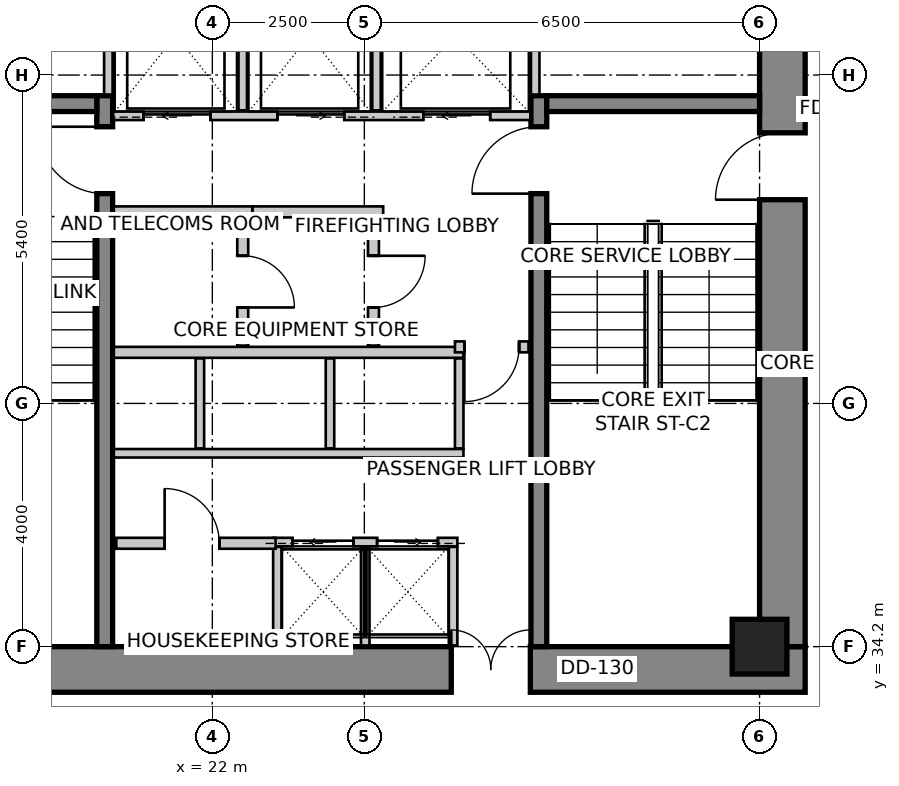
"""IFC4 building model, lengths in metres.
Left out: names, types, materials, properties, quantities, classifications, styles, units other than length and angle.
Written with IfcOpenShell. Run it as: python <this file> out.ifc"""

import sys

from ifc_helpers import new_model, si_unit, direction, frame, frame_2d, origin, origin_2d, place, context, subcontext, project, spatial, rectangle, extrude, source, transform, mapped, element, fill, save


model = new_model("IFC4")
c1 = context("Model", 3, precision=1e-05, world=origin(), true_north=direction((0.0, 1.0)))
c2 = subcontext(c1, "Body", "Model", "MODEL_VIEW")
j1 = project(units=[si_unit("LENGTHUNIT", "METRE"), si_unit("PLANEANGLEUNIT", "RADIAN")], contexts=[c1])
p1 = place(None, origin())
s1 = spatial("IfcSite", under=j1, at=p1, CompositionType="ELEMENT")
p2 = place(p1, origin())
s2 = spatial("IfcBuilding", under=s1, at=p2, CompositionType="ELEMENT")
p3 = place(p2, frame((0.0, 0.0, 125.0)))
s3 = spatial("IfcBuildingStorey", under=s2, at=p3, CompositionType="ELEMENT", Elevation=125.0)
p4 = place(p3, frame((15.85, 33.825, 0.0), z_axis=(0.0, 0.0, 1.0), x_axis=(1.0, 0.0, 0.0)))
e1 = element("IfcWall", 1, at=p4, inside=s3, PredefinedType="SHEAR", context=c2, shape_type="SweptSolid", body=[
    extrude(rectangle(XDim=15.9, YDim=0.75, at=frame_2d((7.95, 0.0))), origin(), (0.0, 0.0, 1.0), 3.6),
])
m1 = source(origin(), c2, "Body", "SweptSolid", [
    extrude(rectangle(XDim=1.3, YDim=2.15, at=frame_2d((0.65, 1.075))), frame((0.0, 0.385, 0.0), z_axis=(0.0, -1.0, 0.0), x_axis=(1.0, 0.0, 0.0)), (0.0, 0.0, 1.0), 0.77),
])
p5 = place(p4, frame((10.08, 0.0, 0.0)))
e2 = element("IfcOpeningElement", 2, at=p5, cuts=e1, PredefinedType="OPENING", context=c2, shape_type="MappedRepresentation", body=[
    mapped(m1, transform((0.0, 0.0, 0.0), scale=1.0)),
])
p6 = place(p3, frame((31.375, 34.2, 0.0), z_axis=(0.0, 0.0, 1.0), x_axis=(0.0, 1.0, 0.0)))
e3 = element("IfcWall", 3, at=p6, inside=s3, PredefinedType="SHEAR", context=c2, shape_type="SweptSolid", body=[
    extrude(rectangle(XDim=11.4, YDim=0.75, at=frame_2d((5.7, 0.0))), origin(), (0.0, 0.0, 1.0), 3.6),
])
m2 = source(origin(), c2, "Body", "SweptSolid", [
    extrude(rectangle(XDim=1.1, YDim=2.15, at=frame_2d((0.55, 1.075))), frame((0.0, 0.385, 0.0), z_axis=(0.0, -1.0, 0.0), x_axis=(1.0, 0.0, 0.0)), (0.0, 0.0, 1.0), 0.77),
])
p7 = place(p6, frame((7.35, 0.0, 0.0)))
e4 = element("IfcOpeningElement", 4, at=p7, cuts=e3, PredefinedType="OPENING", context=c2, shape_type="MappedRepresentation", body=[
    mapped(m2, transform((0.0, 0.0, 0.0), scale=1.0)),
])
p8 = place(p3, frame((20.23, 34.2, 0.0), z_axis=(0.0, 0.0, 1.0), x_axis=(0.0, 1.0, 0.0)))
e5 = element("IfcWall", 5, at=p8, inside=s3, PredefinedType="SHEAR", context=c2, shape_type="SweptSolid", body=[
    extrude(rectangle(XDim=9.06, YDim=0.26, at=frame_2d((4.53, 0.0))), origin(), (0.0, 0.0, 1.0), 3.6),
])
m3 = source(origin(), c2, "Body", "SweptSolid", [
    extrude(rectangle(XDim=1.1, YDim=2.15, at=frame_2d((0.55, 1.075))), frame((0.0, 0.14, 0.0), z_axis=(0.0, -1.0, 0.0), x_axis=(1.0, 0.0, 0.0)), (0.0, 0.0, 1.0), 0.28),
])
p9 = place(p8, frame((7.45, 0.0, 0.0)))
e6 = element("IfcOpeningElement", 6, at=p9, cuts=e5, PredefinedType="OPENING", context=c2, shape_type="MappedRepresentation", body=[
    mapped(m3, transform((0.0, 0.0, 0.0), scale=1.0)),
])
p10 = place(p3, frame((27.37, 34.2, 0.0), z_axis=(0.0, 0.0, 1.0), x_axis=(0.0, 1.0, 0.0)))
e7 = element("IfcWall", 7, at=p10, inside=s3, PredefinedType="SHEAR", context=c2, shape_type="SweptSolid", body=[
    extrude(rectangle(XDim=9.06, YDim=0.26, at=frame_2d((4.53, 0.0))), origin(), (0.0, 0.0, 1.0), 3.6),
])
p11 = place(p10, frame((7.45, 0.0, 0.0)))
e8 = element("IfcOpeningElement", 8, at=p11, cuts=e7, PredefinedType="OPENING", context=c2, shape_type="MappedRepresentation", body=[
    mapped(m3, transform((0.0, 0.0, 0.0), scale=1.0)),
])
for number, where, z_axis, x_axis in (
    (9, (16.6, 43.13, 0.0), (0.0, 0.0, 1.0), (1.0, 0.0, 0.0)),
    (10, (27.5, 43.13, 0.0), (0.0, 0.0, 1.0), (1.0, 0.0, 0.0)),
):
    element("IfcWall", number, at=place(p3, frame(where, z_axis=z_axis, x_axis=x_axis)), inside=s3, PredefinedType="SHEAR", context=c2, shape_type="SweptSolid", body=[
        extrude(rectangle(XDim=3.5, YDim=0.26, at=frame_2d((1.75, 0.0))), origin(), (0.0, 0.0, 1.0), 3.6),
    ])
m4 = source(origin(), c2, "Body", "SweptSolid", [
    extrude(rectangle(XDim=0.9, YDim=0.9, at=origin_2d()), origin(), (0.0, 0.0, 1.0), 3.6),
])
p12 = place(p3, frame((31.0, 34.2, 0.0), z_axis=(0.0, 0.0, 1.0), x_axis=(1.0, 0.0, 0.0)))
e11 = element("IfcColumn", 11, at=p12, inside=s3, PredefinedType="COLUMN", context=c2, shape_type="MappedRepresentation", body=[
    mapped(m4, transform((0.0, 0.0, 0.0), scale=1.0)),
])
p13 = place(p3, frame((20.37, 42.93, 0.0), z_axis=(0.0, 0.0, 1.0), x_axis=(1.0, 0.0, 0.0)))
e12 = element("IfcWall", 12, at=p13, inside=s3, PredefinedType="SOLIDWALL", context=c2, shape_type="SweptSolid", body=[
    extrude(rectangle(XDim=6.86, YDim=0.14, at=frame_2d((3.43, 0.0))), origin(), (0.0, 0.0, 1.0), 3.35),
])
m5 = source(origin(), c2, "Body", "SweptSolid", [
    extrude(rectangle(XDim=1.1, YDim=2.15, at=frame_2d((0.55, 1.075))), frame((0.0, 0.08, 0.0), z_axis=(0.0, -1.0, 0.0), x_axis=(1.0, 0.0, 0.0)), (0.0, 0.0, 1.0), 0.16),
])
p14 = place(p13, frame((0.5, 0.0, 0.0)))
e13 = element("IfcOpeningElement", 13, at=p14, cuts=e12, PredefinedType="OPENING", context=c2, shape_type="MappedRepresentation", body=[
    mapped(m5, transform((0.0, 0.0, 0.0), scale=1.0)),
])
p15 = place(p13, frame((2.7, 0.0, 0.0)))
e14 = element("IfcOpeningElement", 14, at=p15, cuts=e12, PredefinedType="OPENING", context=c2, shape_type="MappedRepresentation", body=[
    mapped(m5, transform((0.0, 0.0, 0.0), scale=1.0)),
])
p16 = place(p13, frame((5.1, 0.0, 0.0)))
e15 = element("IfcOpeningElement", 15, at=p16, cuts=e12, PredefinedType="OPENING", context=c2, shape_type="MappedRepresentation", body=[
    mapped(m5, transform((0.0, 0.0, 0.0), scale=1.0)),
])
for number, where, z_axis, x_axis in (
    (16, (20.29, 43.28, 0.0), (0.0, 0.0, 1.0), (0.0, 1.0, 0.0)),
    (17, (27.31, 43.28, 0.0), (0.0, 0.0, 1.0), (0.0, 1.0, 0.0)),
):
    element("IfcWall", number, at=place(p3, frame(where, z_axis=z_axis, x_axis=x_axis)), inside=s3, PredefinedType="SOLIDWALL", context=c2, shape_type="SweptSolid", body=[
        extrude(rectangle(XDim=2.3, YDim=0.14, at=frame_2d((1.15, 0.0))), origin(), (0.0, 0.0, 1.0), 3.35),
    ])
for number, where, z_axis, x_axis in (
    (18, (22.5, 43.02, 0.0), (0.0, 0.0, 1.0), (0.0, 1.0, 0.0)),
    (19, (24.7, 43.02, 0.0), (0.0, 0.0, 1.0), (0.0, 1.0, 0.0)),
):
    element("IfcWall", number, at=place(p3, frame(where, z_axis=z_axis, x_axis=x_axis)), inside=s3, PredefinedType="SOLIDWALL", context=c2, shape_type="SweptSolid", body=[
        extrude(rectangle(XDim=2.56, YDim=0.14, at=frame_2d((1.28, 0.0))), origin(), (0.0, 0.0, 1.0), 3.35),
    ])
p17 = place(p3, frame((23.0, 35.92, 0.0), z_axis=(0.0, 0.0, 1.0), x_axis=(1.0, 0.0, 0.0)))
e20 = element("IfcWall", 20, at=p17, inside=s3, PredefinedType="SOLIDWALL", context=c2, shape_type="SweptSolid", body=[
    extrude(rectangle(XDim=3.03, YDim=0.14, at=frame_2d((1.515, 0.0))), origin(), (0.0, 0.0, 1.0), 3.35),
])
m6 = source(origin(), c2, "Body", "SweptSolid", [
    extrude(rectangle(XDim=1.0, YDim=2.15, at=frame_2d((0.5, 1.075))), frame((0.0, 0.08, 0.0), z_axis=(0.0, -1.0, 0.0), x_axis=(1.0, 0.0, 0.0)), (0.0, 0.0, 1.0), 0.16),
])
p18 = place(p17, frame((0.32, 0.0, 0.0)))
e21 = element("IfcOpeningElement", 21, at=p18, cuts=e20, PredefinedType="OPENING", context=c2, shape_type="MappedRepresentation", body=[
    mapped(m6, transform((0.0, 0.0, 0.0), scale=1.0)),
])
p19 = place(p17, frame((1.71, 0.0, 0.0)))
e22 = element("IfcOpeningElement", 22, at=p19, cuts=e20, PredefinedType="OPENING", context=c2, shape_type="MappedRepresentation", body=[
    mapped(m6, transform((0.0, 0.0, 0.0), scale=1.0)),
])
for number, where, z_axis, x_axis in (
    (23, (25.96, 34.22, 0.0), (0.0, 0.0, 1.0), (0.0, 1.0, 0.0)),
    (24, (23.07, 34.22, 0.0), (0.0, 0.0, 1.0), (0.0, 1.0, 0.0)),
    (25, (24.515, 34.22, 0.0), (0.0, 0.0, 1.0), (0.0, 1.0, 0.0)),
):
    element("IfcWall", number, at=place(p3, frame(where, z_axis=z_axis, x_axis=x_axis)), inside=s3, PredefinedType="SOLIDWALL", context=c2, shape_type="SweptSolid", body=[
        extrude(rectangle(XDim=1.62, YDim=0.14, at=frame_2d((0.81, 0.0))), origin(), (0.0, 0.0, 1.0), 2.642),
    ])
p20 = place(p3, frame((20.38, 37.38, 0.0), z_axis=(0.0, 0.0, 1.0), x_axis=(1.0, 0.0, 0.0)))
e26 = element("IfcWall", 26, at=p20, inside=s3, PredefinedType="SOLIDWALL", context=c2, shape_type="SweptSolid", body=[
    extrude(rectangle(XDim=5.75, YDim=0.14, at=frame_2d((2.875, 0.0))), origin(), (0.0, 0.0, 1.0), 3.35),
])
p21 = place(p3, frame((20.38, 39.04, 0.0), z_axis=(0.0, 0.0, 1.0), x_axis=(1.0, 0.0, 0.0)))
e27 = element("IfcWall", 27, at=p21, inside=s3, PredefinedType="SOLIDWALL", context=c2, shape_type="SweptSolid", body=[
    extrude(rectangle(XDim=5.75, YDim=0.18, at=frame_2d((2.875, 0.0))), origin(), (0.0, 0.0, 1.0), 3.35),
])
for number, where, z_axis, x_axis in (
    (28, (26.06, 37.46, 0.0), (0.0, 0.0, 1.0), (0.0, 1.0, 0.0)),
    (29, (21.795, 37.46, 0.0), (0.0, 0.0, 1.0), (0.0, 1.0, 0.0)),
    (30, (23.935, 37.46, 0.0), (0.0, 0.0, 1.0), (0.0, 1.0, 0.0)),
):
    element("IfcWall", number, at=place(p3, frame(where, z_axis=z_axis, x_axis=x_axis)), inside=s3, PredefinedType="SOLIDWALL", context=c2, shape_type="SweptSolid", body=[
        extrude(rectangle(XDim=1.48, YDim=0.14, at=frame_2d((0.74, 0.0))), origin(), (0.0, 0.0, 1.0), 3.35),
    ])
p22 = place(p3, frame((22.66, 41.35, 0.0), z_axis=(0.0, 0.0, 1.0), x_axis=(-1.0, 0.0, 0.0)))
e31 = element("IfcWall", 31, at=p22, inside=s3, PredefinedType="PARTITIONING", context=c2, shape_type="SweptSolid", body=[
    extrude(rectangle(XDim=2.28, YDim=0.18, at=frame_2d((1.14, 0.0))), origin(), (0.0, 0.0, 1.0), 3.35),
])
p23 = place(p3, frame((24.81, 41.35, 0.0), z_axis=(0.0, 0.0, 1.0), x_axis=(-1.0, 0.0, 0.0)))
e32 = element("IfcWall", 32, at=p23, inside=s3, PredefinedType="PARTITIONING", context=c2, shape_type="SweptSolid", body=[
    extrude(rectangle(XDim=2.148, YDim=0.18, at=frame_2d((1.074, 0.0))), origin(), (0.0, 0.0, 1.0), 3.35),
])
p24 = place(p3, frame((22.5, 41.256, 0.0), z_axis=(0.0, 0.0, 1.0), x_axis=(0.0, -1.0, 0.0)))
e33 = element("IfcWall", 33, at=p24, inside=s3, PredefinedType="PARTITIONING", context=c2, shape_type="SweptSolid", body=[
    extrude(rectangle(XDim=2.106, YDim=0.18, at=frame_2d((1.053, 0.0))), origin(), (0.0, 0.0, 1.0), 3.35),
])
m7 = source(origin(), c2, "Body", "SweptSolid", [
    extrude(rectangle(XDim=0.85, YDim=2.15, at=frame_2d((0.425, 1.075))), frame((0.0, 0.1, 0.0), z_axis=(0.0, -1.0, 0.0), x_axis=(1.0, 0.0, 0.0)), (0.0, 0.0, 1.0), 0.2),
])
p25 = place(p24, frame((0.628, 0.0, 0.0)))
e34 = element("IfcOpeningElement", 34, at=p25, cuts=e33, PredefinedType="OPENING", context=c2, shape_type="MappedRepresentation", body=[
    mapped(m7, transform((0.0, 0.0, 0.0), scale=1.0)),
])
p26 = place(p3, frame((24.65, 41.256, 0.0), z_axis=(0.0, 0.0, 1.0), x_axis=(0.0, -1.0, 0.0)))
e35 = element("IfcWall", 35, at=p26, inside=s3, PredefinedType="PARTITIONING", context=c2, shape_type="SweptSolid", body=[
    extrude(rectangle(XDim=2.106, YDim=0.18, at=frame_2d((1.053, 0.0))), origin(), (0.0, 0.0, 1.0), 3.35),
])
p27 = place(p26, frame((0.628, 0.0, 0.0)))
e36 = element("IfcOpeningElement", 36, at=p27, cuts=e35, PredefinedType="OPENING", context=c2, shape_type="MappedRepresentation", body=[
    mapped(m7, transform((0.0, 0.0, 0.0), scale=1.0)),
])
p28 = place(p3, frame((27.2, 39.13, 0.0), z_axis=(0.0, 0.0, 1.0), x_axis=(-1.0, 0.0, 0.0)))
e37 = element("IfcWall", 37, at=p28, inside=s3, PredefinedType="PARTITIONING", context=c2, shape_type="SweptSolid", body=[
    extrude(rectangle(XDim=1.21, YDim=0.18, at=frame_2d((0.605, 0.0))), origin(), (0.0, 0.0, 1.0), 3.35),
])
m8 = source(origin(), c2, "Body", "SweptSolid", [
    extrude(rectangle(XDim=0.9, YDim=2.15, at=frame_2d((0.45, 1.075))), frame((0.0, 0.1, 0.0), z_axis=(0.0, -1.0, 0.0), x_axis=(1.0, 0.0, 0.0)), (0.0, 0.0, 1.0), 0.2),
])
p29 = place(p28, frame((0.155, 0.0, 0.0)))
e38 = element("IfcOpeningElement", 38, at=p29, cuts=e37, PredefinedType="OPENING", context=c2, shape_type="MappedRepresentation", body=[
    mapped(m8, transform((0.0, 0.0, 0.0), scale=1.0)),
])
p30 = place(p3, frame((20.42, 35.9, 0.0), z_axis=(0.0, 0.0, 1.0), x_axis=(1.0, 0.0, 0.0)))
e39 = element("IfcWall", 39, at=p30, inside=s3, PredefinedType="PARTITIONING", context=c2, shape_type="SweptSolid", body=[
    extrude(rectangle(XDim=2.62, YDim=0.18, at=frame_2d((1.31, 0.0))), origin(), (0.0, 0.0, 1.0), 3.35),
])
p31 = place(p30, frame((0.796, 0.0, 0.0)))
e40 = element("IfcOpeningElement", 40, at=p31, cuts=e39, PredefinedType="OPENING", context=c2, shape_type="MappedRepresentation", body=[
    mapped(m8, transform((0.0, 0.0, 0.0), scale=1.0)),
])
m9 = source(origin(), c2, "Body", "SweptSolid", [
    extrude(rectangle(XDim=1.1, YDim=2.15, at=frame_2d((0.55, 1.075))), frame((0.0, 0.025, 0.0), z_axis=(0.0, -1.0, 0.0), x_axis=(1.0, 0.0, 0.0)), (0.0, 0.0, 1.0), 0.05),
])
p32 = place(p14, origin())
e41 = element("IfcDoor", 41, at=p32, inside=s3, OperationType="SLIDING_TO_LEFT", PredefinedType="DOOR", context=c2, shape_type="MappedRepresentation", body=[
    mapped(m9, transform((0.0, 0.0, 0.0), scale=1.0)),
])
fill(e13, e41)
p33 = place(p15, origin())
e42 = element("IfcDoor", 42, at=p33, inside=s3, OperationType="SLIDING_TO_RIGHT", PredefinedType="DOOR", context=c2, shape_type="MappedRepresentation", body=[
    mapped(m9, transform((0.0, 0.0, 0.0), scale=1.0)),
])
fill(e14, e42)
m10 = source(origin(), c2, "Body", "SweptSolid", [
    extrude(rectangle(XDim=1.1, YDim=2.15, at=frame_2d((0.55, 1.075))), frame((0.0, 0.025, 0.0), z_axis=(0.0, -1.0, 0.0), x_axis=(1.0, 0.0, 0.0)), (0.0, 0.0, 1.0), 0.05),
])
p34 = place(p16, origin())
e43 = element("IfcDoor", 43, at=p34, inside=s3, OperationType="SLIDING_TO_LEFT", PredefinedType="DOOR", context=c2, shape_type="MappedRepresentation", body=[
    mapped(m10, transform((0.0, 0.0, 0.0), scale=1.0)),
])
fill(e15, e43)
m11 = source(origin(), c2, "Body", "SweptSolid", [
    extrude(rectangle(XDim=1.0, YDim=2.15, at=frame_2d((0.5, 1.075))), frame((0.0, 0.025, 0.0), z_axis=(0.0, -1.0, 0.0), x_axis=(1.0, 0.0, 0.0)), (0.0, 0.0, 1.0), 0.05),
])
p35 = place(p18, origin())
e44 = element("IfcDoor", 44, at=p35, inside=s3, OperationType="SLIDING_TO_LEFT", PredefinedType="DOOR", context=c2, shape_type="MappedRepresentation", body=[
    mapped(m11, transform((0.0, 0.0, 0.0), scale=1.0)),
])
fill(e21, e44)
p36 = place(p19, origin())
e45 = element("IfcDoor", 45, at=p36, inside=s3, OperationType="SLIDING_TO_RIGHT", PredefinedType="DOOR", context=c2, shape_type="MappedRepresentation", body=[
    mapped(m11, transform((0.0, 0.0, 0.0), scale=1.0)),
])
fill(e22, e45)
m12 = source(origin(), c2, "Body", "SweptSolid", [
    extrude(rectangle(XDim=1.1, YDim=2.15, at=frame_2d((0.55, 1.075))), frame((0.0, 0.025, 0.0), z_axis=(0.0, -1.0, 0.0), x_axis=(1.0, 0.0, 0.0)), (0.0, 0.0, 1.0), 0.05),
])
p37 = place(p9, origin())
e46 = element("IfcDoor", 46, at=p37, inside=s3, OperationType="SINGLE_SWING_RIGHT", PredefinedType="DOOR", context=c2, shape_type="MappedRepresentation", body=[
    mapped(m12, transform((0.0, 0.0, 0.0), scale=1.0)),
])
fill(e6, e46)
p38 = place(p11, origin())
e47 = element("IfcDoor", 47, at=p38, inside=s3, OperationType="SINGLE_SWING_LEFT", PredefinedType="DOOR", context=c2, shape_type="MappedRepresentation", body=[
    mapped(m12, transform((0.0, 0.0, 0.0), scale=1.0)),
])
fill(e8, e47)
p39 = place(p7, origin())
e48 = element("IfcDoor", 48, at=p39, inside=s3, OperationType="SINGLE_SWING_LEFT", PredefinedType="DOOR", context=c2, shape_type="MappedRepresentation", body=[
    mapped(m12, transform((0.0, 0.0, 0.0), scale=1.0)),
])
fill(e4, e48)
m13 = source(origin(), c2, "Body", "SweptSolid", [
    extrude(rectangle(XDim=1.3, YDim=2.15, at=frame_2d((0.65, 1.075))), frame((0.0, 0.025, 0.0), z_axis=(0.0, -1.0, 0.0), x_axis=(1.0, 0.0, 0.0)), (0.0, 0.0, 1.0), 0.05),
])
p40 = place(p5, origin())
e49 = element("IfcDoor", 49, at=p40, inside=s3, OperationType="DOUBLE_DOOR_SINGLE_SWING", PredefinedType="DOOR", context=c2, shape_type="MappedRepresentation", body=[
    mapped(m13, transform((0.0, 0.0, 0.0), scale=1.0)),
])
fill(e2, e49)
m14 = source(origin(), c2, "Body", "SweptSolid", [
    extrude(rectangle(XDim=0.85, YDim=2.15, at=frame_2d((0.425, 1.075))), frame((0.0, 0.025, 0.0), z_axis=(0.0, -1.0, 0.0), x_axis=(1.0, 0.0, 0.0)), (0.0, 0.0, 1.0), 0.05),
])
p41 = place(p25, origin())
e50 = element("IfcDoor", 50, at=p41, inside=s3, OperationType="SINGLE_SWING_RIGHT", PredefinedType="DOOR", context=c2, shape_type="MappedRepresentation", body=[
    mapped(m14, transform((0.0, 0.0, 0.0), scale=1.0)),
])
fill(e34, e50)
p42 = place(p27, origin())
e51 = element("IfcDoor", 51, at=p42, inside=s3, OperationType="SINGLE_SWING_LEFT", PredefinedType="DOOR", context=c2, shape_type="MappedRepresentation", body=[
    mapped(m14, transform((0.0, 0.0, 0.0), scale=1.0)),
])
fill(e36, e51)
m15 = source(origin(), c2, "Body", "SweptSolid", [
    extrude(rectangle(XDim=0.9, YDim=2.15, at=frame_2d((0.45, 1.075))), frame((0.0, 0.025, 0.0), z_axis=(0.0, -1.0, 0.0), x_axis=(1.0, 0.0, 0.0)), (0.0, 0.0, 1.0), 0.05),
])
p43 = place(p29, origin())
e52 = element("IfcDoor", 52, at=p43, inside=s3, OperationType="SINGLE_SWING_RIGHT", PredefinedType="DOOR", context=c2, shape_type="MappedRepresentation", body=[
    mapped(m15, transform((0.0, 0.0, 0.0), scale=1.0)),
])
fill(e38, e52)
p44 = place(p31, origin())
e53 = element("IfcDoor", 53, at=p44, inside=s3, OperationType="SINGLE_SWING_LEFT", PredefinedType="DOOR", context=c2, shape_type="MappedRepresentation", body=[
    mapped(m15, transform((0.0, 0.0, 0.0), scale=1.0)),
])
fill(e40, e53)
save(model, sys.argv[1])
